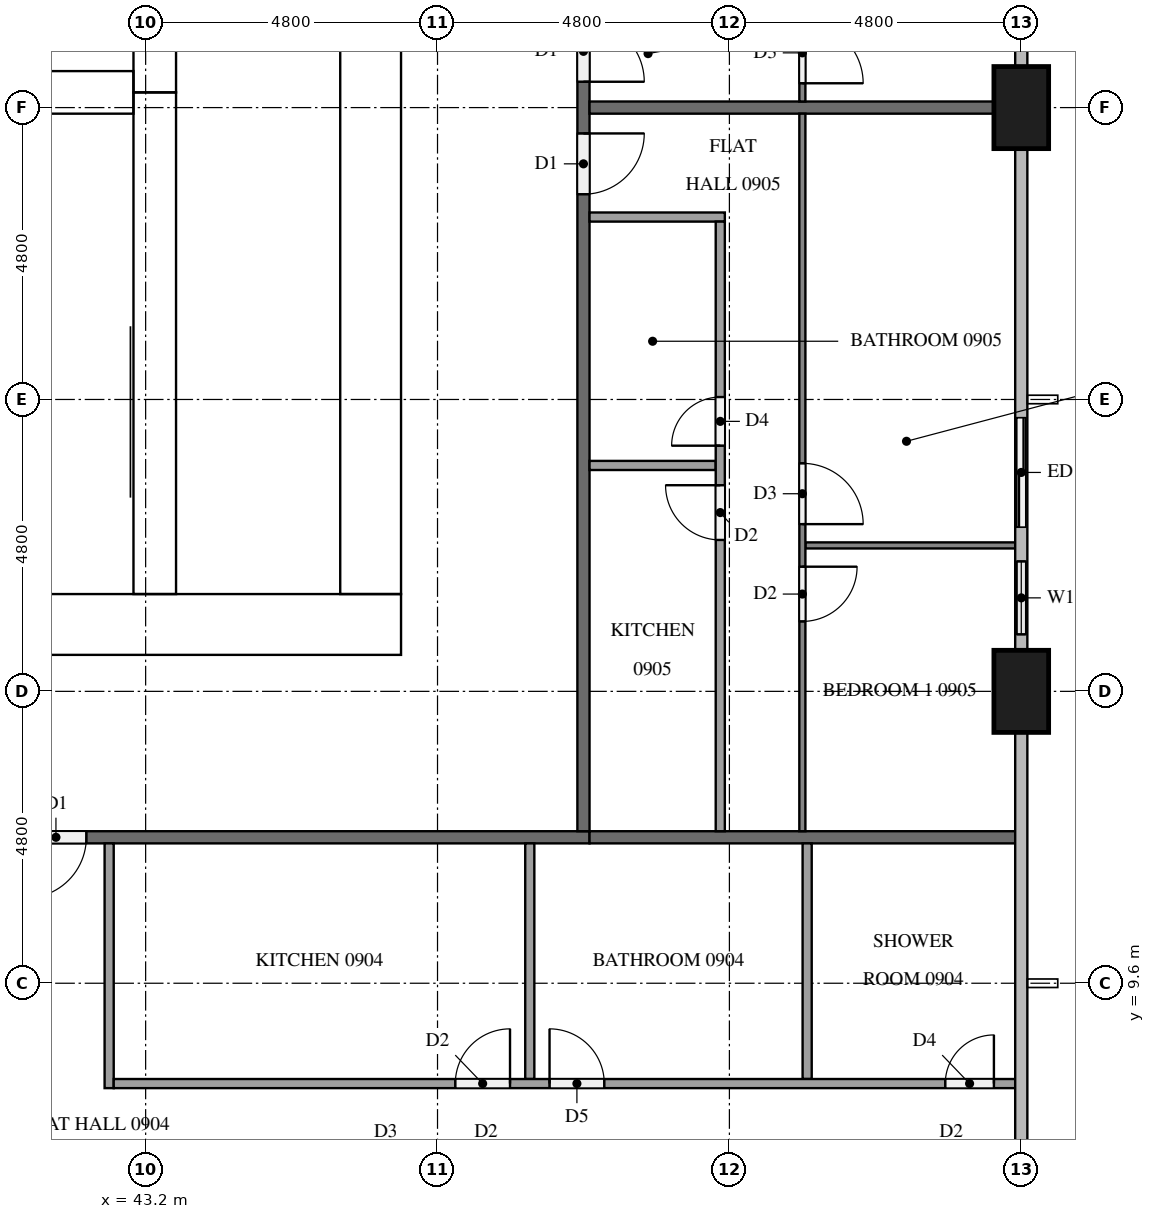
"""IFC4 building model, lengths in metres.
Left out: names, types, materials, properties, quantities, classifications, styles, units other than length and angle.
Written with IfcOpenShell. Run it as: python <this file> out.ifc"""

import sys

from ifc_helpers import new_model, si_unit, direction, frame, frame_2d, origin, origin_2d, place, context, subcontext, project, spatial, rectangle, extrude, element, fill, save


model = new_model("IFC4")
c1 = context("Model", 3, precision=1e-05, world=origin(), true_north=direction((0.0, 1.0)))
c2 = subcontext(c1, "Body", "Model", "MODEL_VIEW")
j1 = project(units=[si_unit("LENGTHUNIT", "METRE"), si_unit("PLANEANGLEUNIT", "RADIAN")], contexts=[c1])
p1 = place(None, origin())
s1 = spatial("IfcSite", under=j1, at=p1, CompositionType="ELEMENT")
p2 = place(p1, origin())
s2 = spatial("IfcBuilding", under=s1, at=p2, CompositionType="ELEMENT")
p3 = place(p2, frame((0.0, 0.0, 39.9)))
s3 = spatial("IfcBuildingStorey", under=s2, at=p3, CompositionType="ELEMENT", Elevation=39.9)
p4 = place(p3, frame((15.0, 15.5, 0.0), z_axis=(0.0, 0.0, 1.0), x_axis=(1.0, 0.0, 0.0)))
e1 = element("IfcWall", 1, at=p4, inside=s3, PredefinedType="SHEAR", context=c2, shape_type="SweptSolid", body=[
    extrude(rectangle(XDim=32.4, YDim=1.0, at=frame_2d((16.2, 0.0))), origin(), (0.0, 0.0, 1.0), 3.2),
])
p5 = place(p4, frame((15.3, 0.0, 0.0)))
e2 = element("IfcOpeningElement", 2, at=p5, cuts=e1, PredefinedType="OPENING", context=c2, shape_type="SweptSolid", body=[
    extrude(rectangle(XDim=1.8, YDim=2.1, at=frame_2d((0.9, 1.05))), frame((0.0, 0.51, 0.0), z_axis=(0.0, -1.0, 0.0), x_axis=(1.0, 0.0, 0.0)), (0.0, 0.0, 1.0), 1.02),
])
p6 = place(p3, frame((46.9, 16.0, 0.0), z_axis=(0.0, 0.0, 1.0), x_axis=(0.0, 1.0, 0.0)))
e3 = element("IfcWall", 3, at=p6, inside=s3, PredefinedType="SHEAR", context=c2, shape_type="SweptSolid", body=[
    extrude(rectangle(XDim=20.8, YDim=1.0, at=frame_2d((10.4, 0.0))), origin(), (0.0, 0.0, 1.0), 3.2),
])
p7 = place(p6, frame((10.1, 0.0, 0.0)))
e4 = element("IfcOpeningElement", 4, at=p7, cuts=e3, PredefinedType="OPENING", context=c2, shape_type="SweptSolid", body=[
    extrude(rectangle(XDim=1.2, YDim=2.1, at=frame_2d((0.6, 1.05))), frame((0.0, 0.51, 0.0), z_axis=(0.0, -1.0, 0.0), x_axis=(1.0, 0.0, 0.0)), (0.0, 0.0, 1.0), 1.02),
])
p8 = place(p3, frame((43.35, 16.0, 0.0), z_axis=(0.0, 0.0, 1.0), x_axis=(0.0, 1.0, 0.0)))
e5 = element("IfcWall", 5, at=p8, inside=s3, PredefinedType="SHEAR", context=c2, shape_type="SweptSolid", body=[
    extrude(rectangle(XDim=8.25, YDim=0.7, at=frame_2d((4.125, 0.0))), origin(), (0.0, 0.0, 1.0), 3.2),
])
p9 = place(p8, frame((0.2, 0.0, 0.0)))
e6 = element("IfcOpeningElement", 6, at=p9, cuts=e5, PredefinedType="OPENING", context=c2, shape_type="SweptSolid", body=[
    extrude(rectangle(XDim=1.2, YDim=2.1, at=frame_2d((0.6, 1.05))), frame((0.0, 0.36, 0.0), z_axis=(0.0, -1.0, 0.0), x_axis=(1.0, 0.0, 0.0)), (0.0, 0.0, 1.0), 0.72),
])
p10 = place(p3, frame((43.35, 24.25, 0.0), z_axis=(0.0, 0.0, 1.0), x_axis=(0.0, 1.0, 0.0)))
e7 = element("IfcWall", 7, at=p10, inside=s3, PredefinedType="SHEAR", context=c2, shape_type="SweptSolid", body=[
    extrude(rectangle(XDim=3.5, YDim=0.7, at=frame_2d((1.75, 0.0))), origin(), (0.0, 0.0, 1.0), 3.2),
])
p11 = place(p10, frame((1.2, 0.0, 0.0)))
e8 = element("IfcOpeningElement", 8, at=p11, cuts=e7, PredefinedType="OPENING", context=c2, shape_type="SweptSolid", body=[
    extrude(rectangle(XDim=1.1, YDim=2.1, at=frame_2d((0.55, 1.05))), frame((0.0, 0.36, 0.0), z_axis=(0.0, -1.0, 0.0), x_axis=(1.0, 0.0, 0.0)), (0.0, 0.0, 1.0), 0.72),
])
p12 = place(p3, frame((39.65, 24.25, 0.0), z_axis=(0.0, 0.0, 1.0), x_axis=(1.0, 0.0, 0.0)))
e9 = element("IfcWall", 9, at=p12, inside=s3, PredefinedType="SHEAR", context=c2, shape_type="SweptSolid", body=[
    extrude(rectangle(XDim=3.35, YDim=0.7, at=frame_2d((1.675, 0.0))), origin(), (0.0, 0.0, 1.0), 3.2),
])
for number, where, z_axis, x_axis in (
    (10, (57.6, 14.4, 0.0), (0.0, 0.0, 1.0), (0.0, 1.0, 0.0)),
    (11, (57.6, 24.0, 0.0), (0.0, 0.0, 1.0), (0.0, 1.0, 0.0)),
):
    element("IfcColumn", number, at=place(p3, frame(where, z_axis=z_axis, x_axis=x_axis)), inside=s3, PredefinedType="COLUMN", context=c2, shape_type="SweptSolid", body=[
        extrude(rectangle(XDim=1.35, YDim=0.9, at=origin_2d()), origin(), (0.0, 0.0, 1.0), 3.2),
    ])
p13 = place(p3, frame((57.6, 15.075, 0.0), z_axis=(0.0, 0.0, 1.0), x_axis=(0.0, 1.0, 0.0)))
e12 = element("IfcWall", 12, at=p13, inside=s3, PredefinedType="SOLIDWALL", context=c2, shape_type="SweptSolid", body=[
    extrude(rectangle(XDim=4.125, YDim=0.15, at=frame_2d((2.062, 0.0))), origin(), (0.0, 0.0, 1.0), 3.2),
])
p14 = place(p13, frame((0.262, 0.0, 0.9)))
e13 = element("IfcOpeningElement", 13, at=p14, cuts=e12, PredefinedType="OPENING", context=c2, shape_type="SweptSolid", body=[
    extrude(rectangle(XDim=1.2, YDim=1.4, at=frame_2d((0.6, 0.7))), frame((0.0, 0.085, 0.0), z_axis=(0.0, -1.0, 0.0), x_axis=(1.0, 0.0, 0.0)), (0.0, 0.0, 1.0), 0.17),
])
p15 = place(p13, frame((2.025, 0.0, 0.0)))
e14 = element("IfcOpeningElement", 14, at=p15, cuts=e12, PredefinedType="OPENING", context=c2, shape_type="SweptSolid", body=[
    extrude(rectangle(XDim=1.8, YDim=2.4, at=frame_2d((0.9, 1.2))), frame((0.0, 0.085, 0.0), z_axis=(0.0, -1.0, 0.0), x_axis=(1.0, 0.0, 0.0)), (0.0, 0.0, 1.0), 0.17),
])
p16 = place(p3, frame((50.5, 12.0, 0.0), z_axis=(0.0, 0.0, 1.0), x_axis=(-1.0, 0.0, 0.0)))
e15 = element("IfcWall", 15, at=p16, inside=s3, PredefinedType="PARTITIONING", context=c2, shape_type="SweptSolid", body=[
    extrude(rectangle(XDim=38.6, YDim=0.2, at=frame_2d((19.3, 0.0))), origin(), (0.0, 0.0, 1.0), 3.2),
])
p17 = place(p16, frame((36.525, 0.0, 0.0)))
e16 = element("IfcOpeningElement", 16, at=p17, cuts=e15, PredefinedType="OPENING", context=c2, shape_type="SweptSolid", body=[
    extrude(rectangle(XDim=1.0, YDim=2.1, at=frame_2d((0.5, 1.05))), frame((0.0, 0.11, 0.0), z_axis=(0.0, -1.0, 0.0), x_axis=(1.0, 0.0, 0.0)), (0.0, 0.0, 1.0), 0.22),
])
p18 = place(p16, frame((24.525, 0.0, 0.0)))
e17 = element("IfcOpeningElement", 17, at=p18, cuts=e15, PredefinedType="OPENING", context=c2, shape_type="SweptSolid", body=[
    extrude(rectangle(XDim=1.0, YDim=2.1, at=frame_2d((0.5, 1.05))), frame((0.0, 0.11, 0.0), z_axis=(0.0, -1.0, 0.0), x_axis=(1.0, 0.0, 0.0)), (0.0, 0.0, 1.0), 0.22),
])
p19 = place(p16, frame((22.675, 0.0, 0.0)))
e18 = element("IfcOpeningElement", 18, at=p19, cuts=e15, PredefinedType="OPENING", context=c2, shape_type="SweptSolid", body=[
    extrude(rectangle(XDim=1.0, YDim=2.1, at=frame_2d((0.5, 1.05))), frame((0.0, 0.11, 0.0), z_axis=(0.0, -1.0, 0.0), x_axis=(1.0, 0.0, 0.0)), (0.0, 0.0, 1.0), 0.22),
])
p20 = place(p16, frame((8.275, 0.0, 0.0)))
e19 = element("IfcOpeningElement", 19, at=p20, cuts=e15, PredefinedType="OPENING", context=c2, shape_type="SweptSolid", body=[
    extrude(rectangle(XDim=1.0, YDim=2.1, at=frame_2d((0.5, 1.05))), frame((0.0, 0.11, 0.0), z_axis=(0.0, -1.0, 0.0), x_axis=(1.0, 0.0, 0.0)), (0.0, 0.0, 1.0), 0.22),
])
p21 = place(p3, frame((50.4, 40.7, 0.0), z_axis=(0.0, 0.0, 1.0), x_axis=(0.0, -1.0, 0.0)))
e20 = element("IfcWall", 20, at=p21, inside=s3, PredefinedType="PARTITIONING", context=c2, shape_type="SweptSolid", body=[
    extrude(rectangle(XDim=28.6, YDim=0.2, at=frame_2d((14.3, 0.0))), origin(), (0.0, 0.0, 1.0), 3.2),
])
p22 = place(p21, frame((17.125, 0.0, 0.0)))
e21 = element("IfcOpeningElement", 21, at=p22, cuts=e20, PredefinedType="OPENING", context=c2, shape_type="SweptSolid", body=[
    extrude(rectangle(XDim=1.0, YDim=2.1, at=frame_2d((0.5, 1.05))), frame((0.0, 0.11, 0.0), z_axis=(0.0, -1.0, 0.0), x_axis=(1.0, 0.0, 0.0)), (0.0, 0.0, 1.0), 0.22),
])
p23 = place(p21, frame((15.275, 0.0, 0.0)))
e22 = element("IfcOpeningElement", 22, at=p23, cuts=e20, PredefinedType="OPENING", context=c2, shape_type="SweptSolid", body=[
    extrude(rectangle(XDim=1.0, YDim=2.1, at=frame_2d((0.5, 1.05))), frame((0.0, 0.11, 0.0), z_axis=(0.0, -1.0, 0.0), x_axis=(1.0, 0.0, 0.0)), (0.0, 0.0, 1.0), 0.22),
])
p24 = place(p21, frame((5.675, 0.0, 0.0)))
e23 = element("IfcOpeningElement", 23, at=p24, cuts=e20, PredefinedType="OPENING", context=c2, shape_type="SweptSolid", body=[
    extrude(rectangle(XDim=1.0, YDim=2.1, at=frame_2d((0.5, 1.05))), frame((0.0, 0.11, 0.0), z_axis=(0.0, -1.0, 0.0), x_axis=(1.0, 0.0, 0.0)), (0.0, 0.0, 1.0), 0.22),
])
p25 = place(p3, frame((50.5, 12.0, 0.0), z_axis=(0.0, 0.0, 1.0), x_axis=(1.0, 0.0, 0.0)))
e24 = element("IfcWall", 24, at=p25, inside=s3, PredefinedType="PARTITIONING", context=c2, shape_type="SweptSolid", body=[
    extrude(rectangle(XDim=7.0, YDim=0.2, at=frame_2d((3.5, 0.0))), origin(), (0.0, 0.0, 1.0), 3.2),
])
p26 = place(p3, frame((50.5, 24.0, 0.0), z_axis=(0.0, 0.0, 1.0), x_axis=(1.0, 0.0, 0.0)))
e25 = element("IfcWall", 25, at=p26, inside=s3, PredefinedType="PARTITIONING", context=c2, shape_type="SweptSolid", body=[
    extrude(rectangle(XDim=6.65, YDim=0.2, at=frame_2d((3.325, 0.0))), origin(), (0.0, 0.0, 1.0), 3.2),
])
for number, where, z_axis, x_axis in (
    (26, (49.517, 11.9, 0.0), (0.0, 0.0, 1.0), (0.0, -1.0, 0.0)),
    (27, (54.079, 11.9, 0.0), (0.0, 0.0, 1.0), (0.0, -1.0, 0.0)),
):
    element("IfcWall", number, at=place(p3, frame(where, z_axis=z_axis, x_axis=x_axis)), inside=s3, PredefinedType="PARTITIONING", context=c2, shape_type="SweptSolid", body=[
        extrude(rectangle(XDim=3.875, YDim=0.15, at=frame_2d((1.938, 0.0))), origin(), (0.0, 0.0, 1.0), 3.2),
    ])
p27 = place(p3, frame((42.6, 11.9, 0.0), z_axis=(0.0, 0.0, 1.0), x_axis=(0.0, -1.0, 0.0)))
e28 = element("IfcWall", 28, at=p27, inside=s3, PredefinedType="PARTITIONING", context=c2, shape_type="SweptSolid", body=[
    extrude(rectangle(XDim=4.025, YDim=0.15, at=frame_2d((2.012, 0.0))), origin(), (0.0, 0.0, 1.0), 3.2),
])
p28 = place(p3, frame((42.675, 7.95, 0.0), z_axis=(0.0, 0.0, 1.0), x_axis=(1.0, 0.0, 0.0)))
e29 = element("IfcWall", 29, at=p28, inside=s3, PredefinedType="PARTITIONING", context=c2, shape_type="SweptSolid", body=[
    extrude(rectangle(XDim=14.825, YDim=0.15, at=frame_2d((7.413, 0.0))), origin(), (0.0, 0.0, 1.0), 3.2),
])
p29 = place(p28, frame((5.617, 0.0, 0.0)))
e30 = element("IfcOpeningElement", 30, at=p29, cuts=e29, PredefinedType="OPENING", context=c2, shape_type="SweptSolid", body=[
    extrude(rectangle(XDim=0.9, YDim=2.1, at=frame_2d((0.45, 1.05))), frame((0.0, 0.085, 0.0), z_axis=(0.0, -1.0, 0.0), x_axis=(1.0, 0.0, 0.0)), (0.0, 0.0, 1.0), 0.17),
])
p30 = place(p28, frame((7.167, 0.0, 0.0)))
e31 = element("IfcOpeningElement", 31, at=p30, cuts=e29, PredefinedType="OPENING", context=c2, shape_type="SweptSolid", body=[
    extrude(rectangle(XDim=0.9, YDim=2.1, at=frame_2d((0.45, 1.05))), frame((0.0, 0.085, 0.0), z_axis=(0.0, -1.0, 0.0), x_axis=(1.0, 0.0, 0.0)), (0.0, 0.0, 1.0), 0.17),
])
p31 = place(p28, frame((13.675, 0.0, 0.0)))
e32 = element("IfcOpeningElement", 32, at=p31, cuts=e29, PredefinedType="OPENING", context=c2, shape_type="SweptSolid", body=[
    extrude(rectangle(XDim=0.8, YDim=2.1, at=frame_2d((0.4, 1.05))), frame((0.0, 0.085, 0.0), z_axis=(0.0, -1.0, 0.0), x_axis=(1.0, 0.0, 0.0)), (0.0, 0.0, 1.0), 0.17),
])
p32 = place(p3, frame((54.05, 16.8, 0.0), z_axis=(0.0, 0.0, 1.0), x_axis=(1.0, 0.0, 0.0)))
e33 = element("IfcWall", 33, at=p32, inside=s3, PredefinedType="PARTITIONING", context=c2, shape_type="SweptSolid", body=[
    extrude(rectangle(XDim=3.45, YDim=0.1, at=frame_2d((1.725, 0.0))), origin(), (0.0, 0.0, 1.0), 3.2),
])
p33 = place(p3, frame((54.0, 23.9, 0.0), z_axis=(0.0, 0.0, 1.0), x_axis=(0.0, -1.0, 0.0)))
e34 = element("IfcWall", 34, at=p33, inside=s3, PredefinedType="PARTITIONING", context=c2, shape_type="SweptSolid", body=[
    extrude(rectangle(XDim=11.8, YDim=0.1, at=frame_2d((5.9, 0.0))), origin(), (0.0, 0.0, 1.0), 3.2),
])
p34 = place(p33, frame((5.75, 0.0, 0.0)))
e35 = element("IfcOpeningElement", 35, at=p34, cuts=e34, PredefinedType="OPENING", context=c2, shape_type="SweptSolid", body=[
    extrude(rectangle(XDim=1.0, YDim=2.1, at=frame_2d((0.5, 1.05))), frame((0.0, 0.06, 0.0), z_axis=(0.0, -1.0, 0.0), x_axis=(1.0, 0.0, 0.0)), (0.0, 0.0, 1.0), 0.12),
])
p35 = place(p33, frame((7.45, 0.0, 0.0)))
e36 = element("IfcOpeningElement", 36, at=p35, cuts=e34, PredefinedType="OPENING", context=c2, shape_type="SweptSolid", body=[
    extrude(rectangle(XDim=0.9, YDim=2.1, at=frame_2d((0.45, 1.05))), frame((0.0, 0.06, 0.0), z_axis=(0.0, -1.0, 0.0), x_axis=(1.0, 0.0, 0.0)), (0.0, 0.0, 1.0), 0.12),
])
p36 = place(p3, frame((50.5, 18.115, 0.0), z_axis=(0.0, 0.0, 1.0), x_axis=(1.0, 0.0, 0.0)))
e37 = element("IfcWall", 37, at=p36, inside=s3, PredefinedType="PARTITIONING", context=c2, shape_type="SweptSolid", body=[
    extrude(rectangle(XDim=2.075, YDim=0.15, at=frame_2d((1.038, 0.0))), origin(), (0.0, 0.0, 1.0), 3.2),
])
p37 = place(p3, frame((50.5, 22.2, 0.0), z_axis=(0.0, 0.0, 1.0), x_axis=(1.0, 0.0, 0.0)))
e38 = element("IfcWall", 38, at=p37, inside=s3, PredefinedType="PARTITIONING", context=c2, shape_type="SweptSolid", body=[
    extrude(rectangle(XDim=2.225, YDim=0.15, at=frame_2d((1.113, 0.0))), origin(), (0.0, 0.0, 1.0), 3.2),
])
p38 = place(p3, frame((52.65, 12.1, 0.0), z_axis=(0.0, 0.0, 1.0), x_axis=(0.0, 1.0, 0.0)))
e39 = element("IfcWall", 39, at=p38, inside=s3, PredefinedType="PARTITIONING", context=c2, shape_type="SweptSolid", body=[
    extrude(rectangle(XDim=10.025, YDim=0.15, at=frame_2d((5.012, 0.0))), origin(), (0.0, 0.0, 1.0), 3.2),
])
p39 = place(p38, frame((6.34, 0.0, 0.0)))
e40 = element("IfcOpeningElement", 40, at=p39, cuts=e39, PredefinedType="OPENING", context=c2, shape_type="SweptSolid", body=[
    extrude(rectangle(XDim=0.8, YDim=2.1, at=frame_2d((0.4, 1.05))), frame((0.0, 0.085, 0.0), z_axis=(0.0, -1.0, 0.0), x_axis=(1.0, 0.0, 0.0)), (0.0, 0.0, 1.0), 0.17),
])
p40 = place(p38, frame((4.79, 0.0, 0.0)))
e41 = element("IfcOpeningElement", 41, at=p40, cuts=e39, PredefinedType="OPENING", context=c2, shape_type="SweptSolid", body=[
    extrude(rectangle(XDim=0.9, YDim=2.1, at=frame_2d((0.45, 1.05))), frame((0.0, 0.085, 0.0), z_axis=(0.0, -1.0, 0.0), x_axis=(1.0, 0.0, 0.0)), (0.0, 0.0, 1.0), 0.17),
])
p41 = place(p3, frame((54.0, 33.5, 0.0), z_axis=(0.0, 0.0, 1.0), x_axis=(0.0, -1.0, 0.0)))
e42 = element("IfcWall", 42, at=p41, inside=s3, PredefinedType="PARTITIONING", context=c2, shape_type="SweptSolid", body=[
    extrude(rectangle(XDim=9.4, YDim=0.1, at=frame_2d((4.7, 0.0))), origin(), (0.0, 0.0, 1.0), 3.2),
])
p42 = place(p41, frame((8.1, 0.0, 0.0)))
e43 = element("IfcOpeningElement", 43, at=p42, cuts=e42, PredefinedType="OPENING", context=c2, shape_type="SweptSolid", body=[
    extrude(rectangle(XDim=1.0, YDim=2.1, at=frame_2d((0.5, 1.05))), frame((0.0, 0.06, 0.0), z_axis=(0.0, -1.0, 0.0), x_axis=(1.0, 0.0, 0.0)), (0.0, 0.0, 1.0), 0.12),
])
p43 = place(p41, frame((0.3, 0.0, 0.0)))
e44 = element("IfcOpeningElement", 44, at=p43, cuts=e42, PredefinedType="OPENING", context=c2, shape_type="SweptSolid", body=[
    extrude(rectangle(XDim=0.9, YDim=2.1, at=frame_2d((0.45, 1.05))), frame((0.0, 0.06, 0.0), z_axis=(0.0, -1.0, 0.0), x_axis=(1.0, 0.0, 0.0)), (0.0, 0.0, 1.0), 0.12),
])
p44 = place(p14, origin())
e45 = element("IfcWindow", 45, at=p44, inside=s3, PartitioningType="SINGLE_PANEL", PredefinedType="WINDOW", context=c2, shape_type="SweptSolid", body=[
    extrude(rectangle(XDim=1.2, YDim=1.4, at=frame_2d((0.6, 0.7))), frame((0.0, 0.03, 0.0), z_axis=(0.0, -1.0, 0.0), x_axis=(1.0, 0.0, 0.0)), (0.0, 0.0, 1.0), 0.06),
])
fill(e13, e45)
p45 = place(p15, origin())
e46 = element("IfcDoor", 46, at=p45, inside=s3, OperationType="SLIDING_TO_RIGHT", PredefinedType="DOOR", context=c2, shape_type="SweptSolid", body=[
    extrude(rectangle(XDim=1.8, YDim=2.4, at=frame_2d((0.9, 1.2))), frame((0.0, 0.025, 0.0), z_axis=(0.0, -1.0, 0.0), x_axis=(1.0, 0.0, 0.0)), (0.0, 0.0, 1.0), 0.05),
])
fill(e14, e46)
p46 = place(p9, origin())
e47 = element("IfcDoor", 47, at=p46, inside=s3, OperationType="SINGLE_SWING_RIGHT", PredefinedType="DOOR", context=c2, shape_type="SweptSolid", body=[
    extrude(rectangle(XDim=1.2, YDim=2.1, at=frame_2d((0.6, 1.05))), frame((0.0, 0.025, 0.0), z_axis=(0.0, -1.0, 0.0), x_axis=(1.0, 0.0, 0.0)), (0.0, 0.0, 1.0), 0.05),
])
fill(e6, e47)
p47 = place(p20, origin())
e48 = element("IfcDoor", 48, at=p47, inside=s3, OperationType="SINGLE_SWING_RIGHT", PredefinedType="DOOR", context=c2, shape_type="SweptSolid", body=[
    extrude(rectangle(XDim=1.0, YDim=2.1, at=frame_2d((0.5, 1.05))), frame((0.0, 0.025, 0.0), z_axis=(0.0, -1.0, 0.0), x_axis=(1.0, 0.0, 0.0)), (0.0, 0.0, 1.0), 0.05),
])
fill(e19, e48)
p48 = place(p22, origin())
e49 = element("IfcDoor", 49, at=p48, inside=s3, OperationType="SINGLE_SWING_LEFT", PredefinedType="DOOR", context=c2, shape_type="SweptSolid", body=[
    extrude(rectangle(XDim=1.0, YDim=2.1, at=frame_2d((0.5, 1.05))), frame((0.0, 0.025, 0.0), z_axis=(0.0, -1.0, 0.0), x_axis=(1.0, 0.0, 0.0)), (0.0, 0.0, 1.0), 0.05),
])
fill(e21, e49)
p49 = place(p23, origin())
e50 = element("IfcDoor", 50, at=p49, inside=s3, OperationType="SINGLE_SWING_RIGHT", PredefinedType="DOOR", context=c2, shape_type="SweptSolid", body=[
    extrude(rectangle(XDim=1.0, YDim=2.1, at=frame_2d((0.5, 1.05))), frame((0.0, 0.025, 0.0), z_axis=(0.0, -1.0, 0.0), x_axis=(1.0, 0.0, 0.0)), (0.0, 0.0, 1.0), 0.05),
])
fill(e22, e50)
p50 = place(p29, origin())
e51 = element("IfcDoor", 51, at=p50, inside=s3, OperationType="SINGLE_SWING_RIGHT", PredefinedType="DOOR", context=c2, shape_type="SweptSolid", body=[
    extrude(rectangle(XDim=0.9, YDim=2.1, at=frame_2d((0.45, 1.05))), frame((0.0, 0.025, 0.0), z_axis=(0.0, -1.0, 0.0), x_axis=(1.0, 0.0, 0.0)), (0.0, 0.0, 1.0), 0.05),
])
fill(e30, e51)
p51 = place(p30, origin())
e52 = element("IfcDoor", 52, at=p51, inside=s3, OperationType="SINGLE_SWING_LEFT", PredefinedType="DOOR", context=c2, shape_type="SweptSolid", body=[
    extrude(rectangle(XDim=0.9, YDim=2.1, at=frame_2d((0.45, 1.05))), frame((0.0, 0.025, 0.0), z_axis=(0.0, -1.0, 0.0), x_axis=(1.0, 0.0, 0.0)), (0.0, 0.0, 1.0), 0.05),
])
fill(e31, e52)
p52 = place(p31, origin())
e53 = element("IfcDoor", 53, at=p52, inside=s3, OperationType="SINGLE_SWING_RIGHT", PredefinedType="DOOR", context=c2, shape_type="SweptSolid", body=[
    extrude(rectangle(XDim=0.8, YDim=2.1, at=frame_2d((0.4, 1.05))), frame((0.0, 0.025, 0.0), z_axis=(0.0, -1.0, 0.0), x_axis=(1.0, 0.0, 0.0)), (0.0, 0.0, 1.0), 0.05),
])
fill(e32, e53)
p53 = place(p34, origin())
e54 = element("IfcDoor", 54, at=p53, inside=s3, OperationType="SINGLE_SWING_RIGHT", PredefinedType="DOOR", context=c2, shape_type="SweptSolid", body=[
    extrude(rectangle(XDim=1.0, YDim=2.1, at=frame_2d((0.5, 1.05))), frame((0.0, 0.025, 0.0), z_axis=(0.0, -1.0, 0.0), x_axis=(1.0, 0.0, 0.0)), (0.0, 0.0, 1.0), 0.05),
])
fill(e35, e54)
p54 = place(p35, origin())
e55 = element("IfcDoor", 55, at=p54, inside=s3, OperationType="SINGLE_SWING_LEFT", PredefinedType="DOOR", context=c2, shape_type="SweptSolid", body=[
    extrude(rectangle(XDim=0.9, YDim=2.1, at=frame_2d((0.45, 1.05))), frame((0.0, 0.025, 0.0), z_axis=(0.0, -1.0, 0.0), x_axis=(1.0, 0.0, 0.0)), (0.0, 0.0, 1.0), 0.05),
])
fill(e36, e55)
p55 = place(p39, origin())
e56 = element("IfcDoor", 56, at=p55, inside=s3, OperationType="SINGLE_SWING_LEFT", PredefinedType="DOOR", context=c2, shape_type="SweptSolid", body=[
    extrude(rectangle(XDim=0.8, YDim=2.1, at=frame_2d((0.4, 1.05))), frame((0.0, 0.025, 0.0), z_axis=(0.0, -1.0, 0.0), x_axis=(1.0, 0.0, 0.0)), (0.0, 0.0, 1.0), 0.05),
])
fill(e40, e56)
p56 = place(p40, origin())
e57 = element("IfcDoor", 57, at=p56, inside=s3, OperationType="SINGLE_SWING_RIGHT", PredefinedType="DOOR", context=c2, shape_type="SweptSolid", body=[
    extrude(rectangle(XDim=0.9, YDim=2.1, at=frame_2d((0.45, 1.05))), frame((0.0, 0.025, 0.0), z_axis=(0.0, -1.0, 0.0), x_axis=(1.0, 0.0, 0.0)), (0.0, 0.0, 1.0), 0.05),
])
fill(e41, e57)
p57 = place(p42, origin())
e58 = element("IfcDoor", 58, at=p57, inside=s3, OperationType="SINGLE_SWING_RIGHT", PredefinedType="DOOR", context=c2, shape_type="SweptSolid", body=[
    extrude(rectangle(XDim=1.0, YDim=2.1, at=frame_2d((0.5, 1.05))), frame((0.0, 0.025, 0.0), z_axis=(0.0, -1.0, 0.0), x_axis=(1.0, 0.0, 0.0)), (0.0, 0.0, 1.0), 0.05),
])
fill(e43, e58)
save(model, sys.argv[1])
